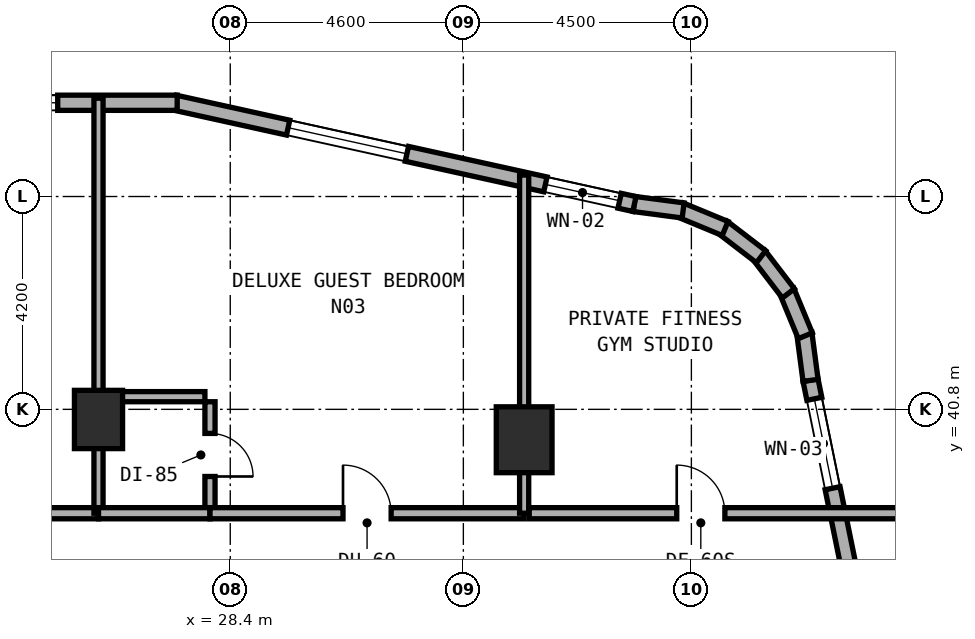
"""IFC4 building model, lengths in metres.
Left out: names, types, materials, properties, quantities, classifications, styles, units other than length and angle.
Written with IfcOpenShell. Run it as: python <this file> out.ifc"""

import sys

from ifc_helpers import new_model, si_unit, direction, frame, frame_2d, origin, origin_2d, place, context, subcontext, project, spatial, rectangle, extrude, element, fill, save


model = new_model("IFC4")
c1 = context("Model", 3, precision=1e-05, world=origin(), true_north=direction((0.0, 1.0)))
c2 = subcontext(c1, "Body", "Model", "MODEL_VIEW")
j1 = project(units=[si_unit("LENGTHUNIT", "METRE"), si_unit("PLANEANGLEUNIT", "RADIAN")], contexts=[c1])
p1 = place(None, origin())
s1 = spatial("IfcSite", under=j1, at=p1, CompositionType="ELEMENT")
p2 = place(p1, origin())
s2 = spatial("IfcBuilding", under=s1, at=p2, CompositionType="ELEMENT")
p3 = place(p2, frame((0.0, 0.0, 27.5)))
s3 = spatial("IfcBuildingStorey", under=s2, at=p3, CompositionType="ELEMENT", Elevation=27.5)
p4 = place(p3, frame((25.8, 40.6, 0.0), z_axis=(0.0, 0.0, 1.0), x_axis=(1.0, 0.0, 0.0)))
e1 = element("IfcColumn", 1, at=p4, inside=s3, PredefinedType="COLUMN", context=c2, shape_type="SweptSolid", body=[
    extrude(rectangle(XDim=0.95, YDim=1.15, at=origin_2d()), origin(), (0.0, 0.0, 1.0), 3.5),
])
p5 = place(p3, frame((34.2, 40.2, 0.0), z_axis=(0.0, 0.0, 1.0), x_axis=(1.0, 0.0, 0.0)))
e2 = element("IfcColumn", 2, at=p5, inside=s3, PredefinedType="COLUMN", context=c2, shape_type="SweptSolid", body=[
    extrude(rectangle(XDim=1.1, YDim=1.3, at=origin_2d()), origin(), (0.0, 0.0, 1.0), 3.5),
])
p6 = place(p3, frame((41.864, 31.516, 0.0), z_axis=(0.0, 0.0, 1.0), x_axis=(-0.199990901713, 0.979797754249, 0.0)))
e3 = element("IfcWall", 3, at=p6, inside=s3, PredefinedType="STANDARD", context=c2, shape_type="SweptSolid", body=[
    extrude(rectangle(XDim=10.065, YDim=0.3, at=frame_2d((5.033, 0.0))), origin(), (0.0, 0.0, 1.0), 3.22),
])
p7 = place(p6, frame((2.429, 0.0, 0.8)))
e4 = element("IfcOpeningElement", 4, at=p7, cuts=e3, PredefinedType="OPENING", context=c2, shape_type="SweptSolid", body=[
    extrude(rectangle(XDim=2.4, YDim=1.6, at=frame_2d((1.2, 0.8))), frame((0.0, 0.16, 0.0), z_axis=(0.0, -1.0, 0.0), x_axis=(1.0, 0.0, 0.0)), (0.0, 0.0, 1.0), 0.32),
])
p8 = place(p6, frame((7.887, 0.0, 0.85)))
e5 = element("IfcOpeningElement", 5, at=p8, cuts=e3, PredefinedType="OPENING", context=c2, shape_type="SweptSolid", body=[
    extrude(rectangle(XDim=1.8, YDim=1.5, at=frame_2d((0.9, 0.75))), frame((0.0, 0.16, 0.0), z_axis=(0.0, -1.0, 0.0), x_axis=(1.0, 0.0, 0.0)), (0.0, 0.0, 1.0), 0.32),
])
p9 = place(p3, frame((39.852, 41.372, 0.0), z_axis=(0.0, 0.0, 1.0), x_axis=(-0.131174864804, 0.991359246108, 0.0)))
e6 = element("IfcWall", 6, at=p9, inside=s3, PredefinedType="STANDARD", context=c2, shape_type="SweptSolid", body=[
    extrude(rectangle(XDim=0.938, YDim=0.3, at=frame_2d((0.469, 0.0))), origin(), (0.0, 0.0, 1.0), 3.22),
])
p10 = place(p3, frame((39.748, 42.252, 0.0), z_axis=(0.0, 0.0, 1.0), x_axis=(-0.382344263057, 0.924019948111, 0.0)))
e7 = element("IfcWall", 7, at=p10, inside=s3, PredefinedType="STANDARD", context=c2, shape_type="SweptSolid", body=[
    extrude(rectangle(XDim=0.955, YDim=0.3, at=frame_2d((0.477, 0.0))), origin(), (0.0, 0.0, 1.0), 3.22),
])
p11 = place(p3, frame((39.414, 43.089, 0.0), z_axis=(0.0, 0.0, 1.0), x_axis=(-0.608474481025, 0.793573440799, 0.0)))
e8 = element("IfcWall", 8, at=p11, inside=s3, PredefinedType="STANDARD", context=c2, shape_type="SweptSolid", body=[
    extrude(rectangle(XDim=0.955, YDim=0.3, at=frame_2d((0.478, 0.0))), origin(), (0.0, 0.0, 1.0), 3.22),
])
p12 = place(p3, frame((38.875, 43.812, 0.0), z_axis=(0.0, 0.0, 1.0), x_axis=(-0.793668068435, 0.608351047625, 0.0)))
e9 = element("IfcWall", 9, at=p12, inside=s3, PredefinedType="STANDARD", context=c2, shape_type="SweptSolid", body=[
    extrude(rectangle(XDim=0.955, YDim=0.3, at=frame_2d((0.478, 0.0))), origin(), (0.0, 0.0, 1.0), 3.22),
])
p13 = place(p3, frame((38.166, 44.369, 0.0), z_axis=(0.0, 0.0, 1.0), x_axis=(-0.924019948111, 0.382344263057, 0.0)))
e10 = element("IfcWall", 10, at=p13, inside=s3, PredefinedType="STANDARD", context=c2, shape_type="SweptSolid", body=[
    extrude(rectangle(XDim=0.955, YDim=0.3, at=frame_2d((0.477, 0.0))), origin(), (0.0, 0.0, 1.0), 3.22),
])
p14 = place(p3, frame((37.337, 44.725, 0.0), z_axis=(0.0, 0.0, 1.0), x_axis=(-0.991454295543, 0.130454512571, 0.0)))
e11 = element("IfcWall", 11, at=p14, inside=s3, PredefinedType="STANDARD", context=c2, shape_type="SweptSolid", body=[
    extrude(rectangle(XDim=0.973, YDim=0.3, at=frame_2d((0.487, 0.0))), origin(), (0.0, 0.0, 1.0), 3.22),
])
p15 = place(p3, frame((36.376, 44.852, 0.0), z_axis=(0.0, 0.0, 1.0), x_axis=(-0.976540764801, 0.215332614068, 0.0)))
e12 = element("IfcWall", 12, at=p15, inside=s3, PredefinedType="STANDARD", context=c2, shape_type="SweptSolid", body=[
    extrude(rectangle(XDim=9.288, YDim=0.3, at=frame_2d((4.644, 0.0))), origin(), (0.0, 0.0, 1.0), 3.22),
])
p16 = place(p15, frame((0.299, 0.0, 0.85)))
e13 = element("IfcOpeningElement", 13, at=p16, cuts=e12, PredefinedType="OPENING", context=c2, shape_type="SweptSolid", body=[
    extrude(rectangle(XDim=1.5, YDim=1.5, at=frame_2d((0.75, 0.75))), frame((0.0, 0.16, 0.0), z_axis=(0.0, -1.0, 0.0), x_axis=(1.0, 0.0, 0.0)), (0.0, 0.0, 1.0), 0.32),
])
p17 = place(p15, frame((4.598, 0.0, 0.8)))
e14 = element("IfcOpeningElement", 14, at=p17, cuts=e12, PredefinedType="OPENING", context=c2, shape_type="SweptSolid", body=[
    extrude(rectangle(XDim=2.4, YDim=1.6, at=frame_2d((1.2, 0.8))), frame((0.0, 0.16, 0.0), z_axis=(0.0, -1.0, 0.0), x_axis=(1.0, 0.0, 0.0)), (0.0, 0.0, 1.0), 0.32),
])
p18 = place(p3, frame((27.353, 46.85, 0.0), z_axis=(0.0, 0.0, 1.0), x_axis=(-1.0, 0.0, 0.0)))
e15 = element("IfcWall", 15, at=p18, inside=s3, PredefinedType="STANDARD", context=c2, shape_type="SweptSolid", body=[
    extrude(rectangle(XDim=12.591, YDim=0.3, at=frame_2d((6.295, 0.0))), origin(), (0.0, 0.0, 1.0), 3.22),
])
p19 = place(p18, frame((5.713, 0.0, 0.0)))
e16 = element("IfcOpeningElement", 16, at=p19, cuts=e15, PredefinedType="OPENING", context=c2, shape_type="SweptSolid", body=[
    extrude(rectangle(XDim=1.2, YDim=2.15, at=frame_2d((0.6, 1.075))), frame((0.0, 0.16, 0.0), z_axis=(0.0, -1.0, 0.0), x_axis=(1.0, 0.0, 0.0)), (0.0, 0.0, 1.0), 0.32),
])
p20 = place(p18, frame((2.358, 0.0, 0.8)))
e17 = element("IfcOpeningElement", 17, at=p20, cuts=e15, PredefinedType="OPENING", context=c2, shape_type="SweptSolid", body=[
    extrude(rectangle(XDim=2.4, YDim=1.6, at=frame_2d((1.2, 0.8))), frame((0.0, 0.16, 0.0), z_axis=(0.0, -1.0, 0.0), x_axis=(1.0, 0.0, 0.0)), (0.0, 0.0, 1.0), 0.32),
])
p21 = place(p18, frame((7.908, 0.0, 0.8)))
e18 = element("IfcOpeningElement", 18, at=p21, cuts=e15, PredefinedType="OPENING", context=c2, shape_type="SweptSolid", body=[
    extrude(rectangle(XDim=2.4, YDim=1.6, at=frame_2d((1.2, 0.8))), frame((0.0, 0.16, 0.0), z_axis=(0.0, -1.0, 0.0), x_axis=(1.0, 0.0, 0.0)), (0.0, 0.0, 1.0), 0.32),
])
p22 = place(p3, frame((18.4, 38.75, 0.0), z_axis=(0.0, 0.0, 1.0), x_axis=(1.0, 0.0, 0.0)))
e19 = element("IfcWall", 19, at=p22, inside=s3, PredefinedType="SOLIDWALL", context=c2, shape_type="SweptSolid", body=[
    extrude(rectangle(XDim=7.4, YDim=0.22, at=frame_2d((3.7, 0.0))), origin(), (0.0, 0.0, 1.0), 2.395),
])
p23 = place(p22, frame((3.225, 0.0, 0.0)))
e20 = element("IfcOpeningElement", 20, at=p23, cuts=e19, PredefinedType="OPENING", context=c2, shape_type="SweptSolid", body=[
    extrude(rectangle(XDim=0.95, YDim=2.1, at=frame_2d((0.475, 1.05))), frame((0.0, 0.12, 0.0), z_axis=(0.0, -1.0, 0.0), x_axis=(1.0, 0.0, 0.0)), (0.0, 0.0, 1.0), 0.24),
])
p24 = place(p3, frame((25.8, 38.75, 0.0), z_axis=(0.0, 0.0, 1.0), x_axis=(0.0, 1.0, 0.0)))
e21 = element("IfcWall", 21, at=p24, inside=s3, PredefinedType="SOLIDWALL", context=c2, shape_type="SweptSolid", body=[
    extrude(rectangle(XDim=8.19, YDim=0.18, at=frame_2d((4.095, 0.0))), origin(), (0.0, 0.0, 1.0), 2.395),
])
p25 = place(p3, frame((28.0, 38.85, 0.0), z_axis=(0.0, 0.0, 1.0), x_axis=(0.0, 1.0, 0.0)))
e22 = element("IfcWall", 22, at=p25, inside=s3, PredefinedType="PLUMBINGWALL", context=c2, shape_type="SweptSolid", body=[
    extrude(rectangle(XDim=2.1, YDim=0.2, at=frame_2d((1.05, 0.0))), origin(), (0.0, 0.0, 1.0), 2.745),
])
p26 = place(p25, frame((0.625, 0.0, 0.0)))
e23 = element("IfcOpeningElement", 23, at=p26, cuts=e22, PredefinedType="OPENING", context=c2, shape_type="SweptSolid", body=[
    extrude(rectangle(XDim=0.85, YDim=2.1, at=frame_2d((0.425, 1.05))), frame((0.0, 0.11, 0.0), z_axis=(0.0, -1.0, 0.0), x_axis=(1.0, 0.0, 0.0)), (0.0, 0.0, 1.0), 0.22),
])
p27 = place(p3, frame((25.9, 41.05, 0.0), z_axis=(0.0, 0.0, 1.0), x_axis=(1.0, 0.0, 0.0)))
e24 = element("IfcWall", 24, at=p27, inside=s3, PredefinedType="PLUMBINGWALL", context=c2, shape_type="SweptSolid", body=[
    extrude(rectangle(XDim=2.0, YDim=0.2, at=frame_2d((1.0, 0.0))), origin(), (0.0, 0.0, 1.0), 3.22),
])
p28 = place(p3, frame((25.8, 38.75, 0.0), z_axis=(0.0, 0.0, 1.0), x_axis=(1.0, 0.0, 0.0)))
e25 = element("IfcWall", 25, at=p28, inside=s3, PredefinedType="SOLIDWALL", context=c2, shape_type="SweptSolid", body=[
    extrude(rectangle(XDim=2.2, YDim=0.22, at=frame_2d((1.1, 0.0))), origin(), (0.0, 0.0, 1.0), 2.395),
])
p29 = place(p3, frame((28.0, 38.75, 0.0), z_axis=(0.0, 0.0, 1.0), x_axis=(1.0, 0.0, 0.0)))
e26 = element("IfcWall", 26, at=p29, inside=s3, PredefinedType="SOLIDWALL", context=c2, shape_type="SweptSolid", body=[
    extrude(rectangle(XDim=6.2, YDim=0.22, at=frame_2d((3.1, 0.0))), origin(), (0.0, 0.0, 1.0), 2.395),
])
p30 = place(p29, frame((2.625, 0.0, 0.0)))
e27 = element("IfcOpeningElement", 27, at=p30, cuts=e26, PredefinedType="OPENING", context=c2, shape_type="SweptSolid", body=[
    extrude(rectangle(XDim=0.95, YDim=2.1, at=frame_2d((0.475, 1.05))), frame((0.0, 0.12, 0.0), z_axis=(0.0, -1.0, 0.0), x_axis=(1.0, 0.0, 0.0)), (0.0, 0.0, 1.0), 0.24),
])
p31 = place(p3, frame((34.2, 38.75, 0.0), z_axis=(0.0, 0.0, 1.0), x_axis=(0.0, 1.0, 0.0)))
e28 = element("IfcWall", 28, at=p31, inside=s3, PredefinedType="SOLIDWALL", context=c2, shape_type="SweptSolid", body=[
    extrude(rectangle(XDim=6.674, YDim=0.18, at=frame_2d((3.337, 0.0))), origin(), (0.0, 0.0, 1.0), 2.395),
])
p32 = place(p3, frame((34.3, 38.75, 0.0), z_axis=(0.0, 0.0, 1.0), x_axis=(1.0, 0.0, 0.0)))
e29 = element("IfcWall", 29, at=p32, inside=s3, PredefinedType="SOLIDWALL", context=c2, shape_type="SweptSolid", body=[
    extrude(rectangle(XDim=7.44, YDim=0.22, at=frame_2d((3.72, 0.0))), origin(), (0.0, 0.0, 1.0), 2.745),
])
p33 = place(p32, frame((2.911, 0.0, 0.0)))
e30 = element("IfcOpeningElement", 30, at=p33, cuts=e29, PredefinedType="OPENING", context=c2, shape_type="SweptSolid", body=[
    extrude(rectangle(XDim=0.95, YDim=2.1, at=frame_2d((0.475, 1.05))), frame((0.0, 0.12, 0.0), z_axis=(0.0, -1.0, 0.0), x_axis=(1.0, 0.0, 0.0)), (0.0, 0.0, 1.0), 0.24),
])
p34 = place(p8, origin())
e31 = element("IfcWindow", 31, at=p34, inside=s3, PartitioningType="SINGLE_PANEL", PredefinedType="WINDOW", context=c2, shape_type="SweptSolid", body=[
    extrude(rectangle(XDim=1.8, YDim=1.5, at=frame_2d((0.9, 0.75))), frame((0.0, 0.03, 0.0), z_axis=(0.0, -1.0, 0.0), x_axis=(1.0, 0.0, 0.0)), (0.0, 0.0, 1.0), 0.06),
])
fill(e5, e31)
p35 = place(p16, origin())
e32 = element("IfcWindow", 32, at=p35, inside=s3, PartitioningType="SINGLE_PANEL", PredefinedType="WINDOW", context=c2, shape_type="SweptSolid", body=[
    extrude(rectangle(XDim=1.5, YDim=1.5, at=frame_2d((0.75, 0.75))), frame((0.0, 0.03, 0.0), z_axis=(0.0, -1.0, 0.0), x_axis=(1.0, 0.0, 0.0)), (0.0, 0.0, 1.0), 0.06),
])
fill(e13, e32)
p36 = place(p17, origin())
e33 = element("IfcWindow", 33, at=p36, inside=s3, PartitioningType="SINGLE_PANEL", PredefinedType="WINDOW", context=c2, shape_type="SweptSolid", body=[
    extrude(rectangle(XDim=2.4, YDim=1.6, at=frame_2d((1.2, 0.8))), frame((0.0, 0.03, 0.0), z_axis=(0.0, -1.0, 0.0), x_axis=(1.0, 0.0, 0.0)), (0.0, 0.0, 1.0), 0.06),
])
fill(e14, e33)
p37 = place(p20, origin())
e34 = element("IfcWindow", 34, at=p37, inside=s3, PartitioningType="SINGLE_PANEL", PredefinedType="WINDOW", context=c2, shape_type="SweptSolid", body=[
    extrude(rectangle(XDim=2.4, YDim=1.6, at=frame_2d((1.2, 0.8))), frame((0.0, 0.03, 0.0), z_axis=(0.0, -1.0, 0.0), x_axis=(1.0, 0.0, 0.0)), (0.0, 0.0, 1.0), 0.06),
])
fill(e17, e34)
p38 = place(p26, frame((0.85, 0.0, 0.0), z_axis=(0.0, 0.0, 1.0), x_axis=(-1.0, 0.0, 0.0)))
e35 = element("IfcDoor", 35, at=p38, inside=s3, OperationType="SINGLE_SWING_RIGHT", PredefinedType="DOOR", context=c2, shape_type="SweptSolid", body=[
    extrude(rectangle(XDim=0.85, YDim=2.1, at=frame_2d((0.425, 1.05))), frame((0.0, 0.025, 0.0), z_axis=(0.0, -1.0, 0.0), x_axis=(1.0, 0.0, 0.0)), (0.0, 0.0, 1.0), 0.05),
])
fill(e23, e35)
p39 = place(p30, origin())
e36 = element("IfcDoor", 36, at=p39, inside=s3, OperationType="SINGLE_SWING_LEFT", PredefinedType="DOOR", context=c2, shape_type="SweptSolid", body=[
    extrude(rectangle(XDim=0.95, YDim=2.1, at=frame_2d((0.475, 1.05))), frame((0.0, 0.025, 0.0), z_axis=(0.0, -1.0, 0.0), x_axis=(1.0, 0.0, 0.0)), (0.0, 0.0, 1.0), 0.05),
])
fill(e27, e36)
p40 = place(p33, origin())
e37 = element("IfcDoor", 37, at=p40, inside=s3, OperationType="SINGLE_SWING_LEFT", PredefinedType="DOOR", context=c2, shape_type="SweptSolid", body=[
    extrude(rectangle(XDim=0.95, YDim=2.1, at=frame_2d((0.475, 1.05))), frame((0.0, 0.025, 0.0), z_axis=(0.0, -1.0, 0.0), x_axis=(1.0, 0.0, 0.0)), (0.0, 0.0, 1.0), 0.05),
])
fill(e30, e37)
save(model, sys.argv[1])
